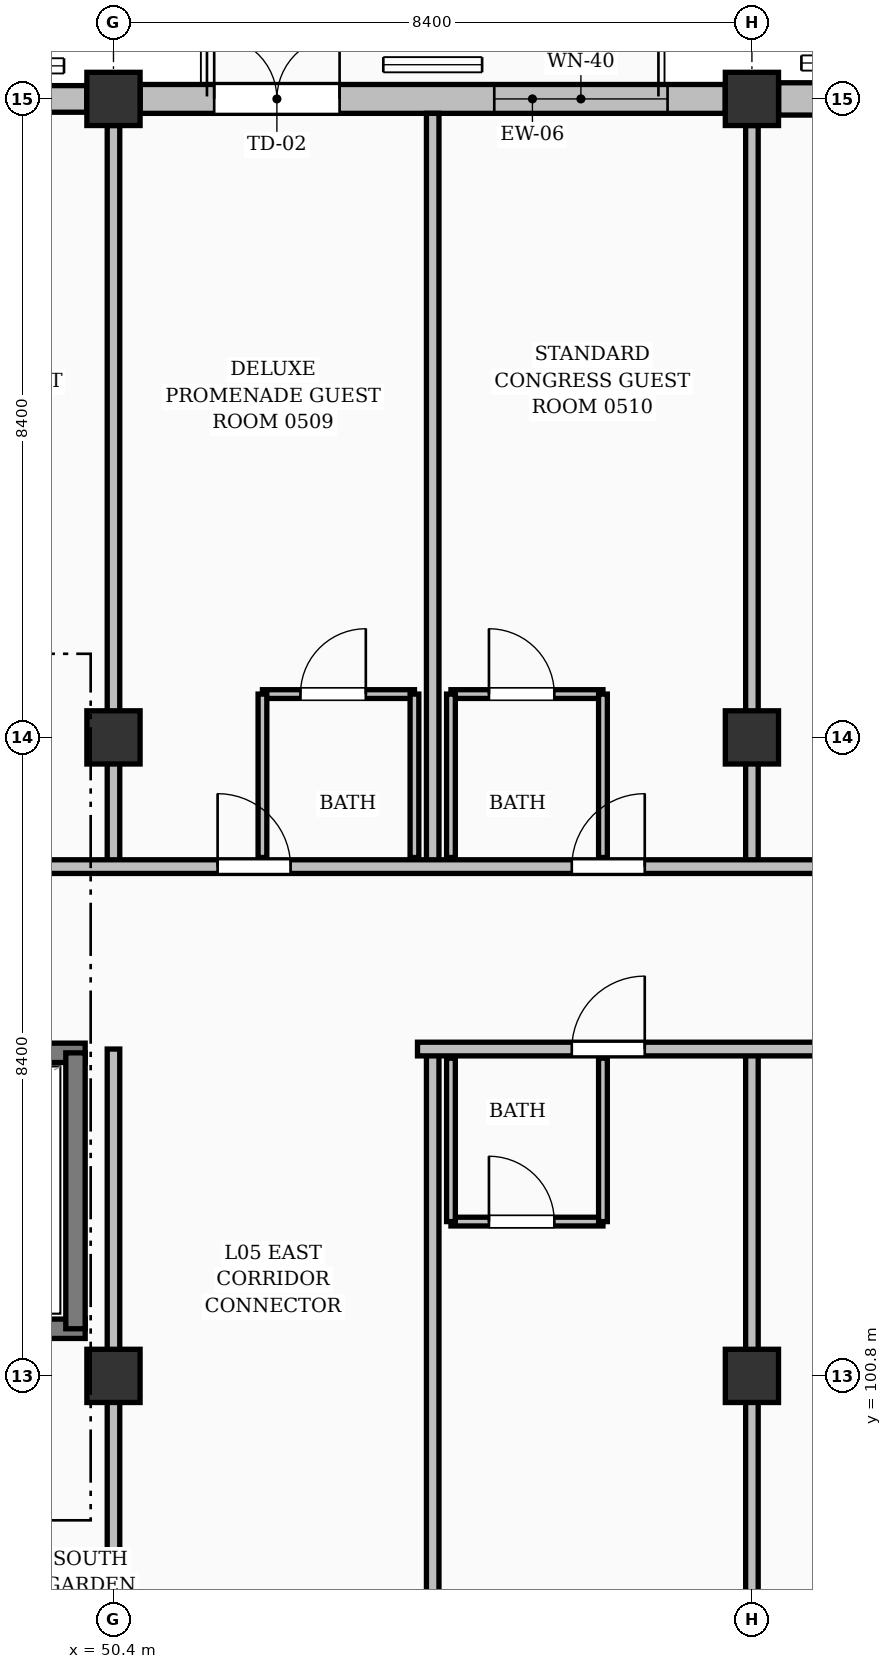
"""IFC4 building model, lengths in metres.
Left out: names, types, materials, properties, quantities, classifications, styles, units other than length and angle.
Written with IfcOpenShell. Run it as: python <this file> out.ifc"""

import sys

from ifc_helpers import new_model, si_unit, direction, frame, frame_2d, origin, origin_2d, place, context, subcontext, project, spatial, rectangle, extrude, element, fill, save


model = new_model("IFC4")
c1 = context("Model", 3, precision=1e-05, world=origin(), true_north=direction((0.0, 1.0)))
c2 = subcontext(c1, "Body", "Model", "MODEL_VIEW")
j1 = project(units=[si_unit("LENGTHUNIT", "METRE"), si_unit("PLANEANGLEUNIT", "RADIAN")], contexts=[c1])
p1 = place(None, origin())
s1 = spatial("IfcSite", under=j1, at=p1, CompositionType="ELEMENT")
p2 = place(p1, origin())
s2 = spatial("IfcBuilding", under=s1, at=p2, CompositionType="ELEMENT")
p3 = place(p2, frame((0.0, 0.0, 18.48)))
s3 = spatial("IfcBuildingStorey", under=s2, at=p3, CompositionType="ELEMENT", Elevation=18.48)
for number, where, z_axis, x_axis in (
    (1, (50.4, 100.8, 0.0), (0.0, 0.0, 1.0), (1.0, 0.0, 0.0)),
    (2, (50.4, 109.2, 0.0), (0.0, 0.0, 1.0), (1.0, 0.0, 0.0)),
    (3, (50.4, 117.6, 0.0), (0.0, 0.0, 1.0), (1.0, 0.0, 0.0)),
    (4, (58.8, 100.8, 0.0), (0.0, 0.0, 1.0), (1.0, 0.0, 0.0)),
    (5, (58.8, 109.2, 0.0), (0.0, 0.0, 1.0), (1.0, 0.0, 0.0)),
    (6, (58.8, 117.6, 0.0), (0.0, 0.0, 1.0), (1.0, 0.0, 0.0)),
):
    element("IfcColumn", number, at=place(p3, frame(where, z_axis=z_axis, x_axis=x_axis)), inside=s3, PredefinedType="COLUMN", context=c2, shape_type="SweptSolid", body=[
        extrude(rectangle(XDim=0.7, YDim=0.7, at=origin_2d()), origin(), (0.0, 0.0, 1.0), 3.36),
    ])
p4 = place(p3, frame((42.351, 117.6, 0.0), z_axis=(0.0, 0.0, 1.0), x_axis=(1.0, 0.0, 0.0)))
e7 = element("IfcWall", 7, at=p4, inside=s3, PredefinedType="SOLIDWALL", context=c2, shape_type="SweptSolid", body=[
    extrude(rectangle(XDim=7.698, YDim=0.35, at=frame_2d((3.849, 0.0))), origin(), (0.0, 0.0, 1.0), 2.494),
])
p5 = place(p4, frame((0.589, 0.0, 0.25)))
e8 = element("IfcOpeningElement", 8, at=p5, cuts=e7, PredefinedType="OPENING", context=c2, shape_type="SweptSolid", body=[
    extrude(rectangle(XDim=2.32, YDim=1.9, at=frame_2d((1.16, 0.95))), frame((0.0, 0.185, 0.0), z_axis=(0.0, -1.0, 0.0), x_axis=(1.0, 0.0, 0.0)), (0.0, 0.0, 1.0), 0.37),
])
p6 = place(p4, frame((4.809, 0.0, 0.25)))
e9 = element("IfcOpeningElement", 9, at=p6, cuts=e7, PredefinedType="OPENING", context=c2, shape_type="SweptSolid", body=[
    extrude(rectangle(XDim=2.28, YDim=2.0, at=frame_2d((1.14, 1.0))), frame((0.0, 0.185, 0.0), z_axis=(0.0, -1.0, 0.0), x_axis=(1.0, 0.0, 0.0)), (0.0, 0.0, 1.0), 0.37),
])
p7 = place(p3, frame((50.751, 117.6, 0.0), z_axis=(0.0, 0.0, 1.0), x_axis=(1.0, 0.0, 0.0)))
e10 = element("IfcWall", 10, at=p7, inside=s3, PredefinedType="SOLIDWALL", context=c2, shape_type="SweptSolid", body=[
    extrude(rectangle(XDim=7.698, YDim=0.38, at=frame_2d((3.849, 0.0))), origin(), (0.0, 0.0, 1.0), 2.494),
])
p8 = place(p7, frame((0.974, 0.0, 0.0)))
e11 = element("IfcOpeningElement", 11, at=p8, cuts=e10, PredefinedType="OPENING", context=c2, shape_type="SweptSolid", body=[
    extrude(rectangle(XDim=1.65, YDim=2.08, at=frame_2d((0.825, 1.04))), frame((0.0, 0.2, 0.0), z_axis=(0.0, -1.0, 0.0), x_axis=(1.0, 0.0, 0.0)), (0.0, 0.0, 1.0), 0.4),
])
p9 = place(p7, frame((4.659, 0.0, 0.25)))
e12 = element("IfcOpeningElement", 12, at=p9, cuts=e10, PredefinedType="OPENING", context=c2, shape_type="SweptSolid", body=[
    extrude(rectangle(XDim=2.28, YDim=2.0, at=frame_2d((1.14, 1.0))), frame((0.0, 0.2, 0.0), z_axis=(0.0, -1.0, 0.0), x_axis=(1.0, 0.0, 0.0)), (0.0, 0.0, 1.0), 0.4),
])
p10 = place(p3, frame((59.151, 117.6, 0.0), z_axis=(0.0, 0.0, 1.0), x_axis=(1.0, 0.0, 0.0)))
e13 = element("IfcWall", 13, at=p10, inside=s3, PredefinedType="SOLIDWALL", context=c2, shape_type="SweptSolid", body=[
    extrude(rectangle(XDim=7.698, YDim=0.425, at=frame_2d((3.849, 0.0))), origin(), (0.0, 0.0, 1.0), 2.494),
])
p11 = place(p10, frame((0.559, 0.0, 0.25)))
e14 = element("IfcOpeningElement", 14, at=p11, cuts=e13, PredefinedType="OPENING", context=c2, shape_type="SweptSolid", body=[
    extrude(rectangle(XDim=2.38, YDim=2.0, at=frame_2d((1.19, 1.0))), frame((0.0, 0.223, 0.0), z_axis=(0.0, -1.0, 0.0), x_axis=(1.0, 0.0, 0.0)), (0.0, 0.0, 1.0), 0.445),
])
p12 = place(p10, frame((4.774, 0.0, 0.25)))
e15 = element("IfcOpeningElement", 15, at=p12, cuts=e13, PredefinedType="OPENING", context=c2, shape_type="SweptSolid", body=[
    extrude(rectangle(XDim=2.35, YDim=1.85, at=frame_2d((1.175, 0.925))), frame((0.0, 0.223, 0.0), z_axis=(0.0, -1.0, 0.0), x_axis=(1.0, 0.0, 0.0)), (0.0, 0.0, 1.0), 0.445),
])
p13 = place(p3, frame((41.802, 101.42, 0.0), z_axis=(0.0, 0.0, 1.0), x_axis=(1.0, 0.0, 0.0)))
e16 = element("IfcWall", 16, at=p13, inside=s3, PredefinedType="SOLIDWALL", context=c2, shape_type="SweptSolid", body=[
    extrude(rectangle(XDim=8.225, YDim=0.255, at=frame_2d((4.113, 0.0))), origin(), (0.0, 0.0, 1.0), 3.12),
])
p14 = place(p3, frame((41.802, 105.05, 0.0), z_axis=(0.0, 0.0, 1.0), x_axis=(1.0, 0.0, 0.0)))
e17 = element("IfcWall", 17, at=p14, inside=s3, PredefinedType="SOLIDWALL", context=c2, shape_type="SweptSolid", body=[
    extrude(rectangle(XDim=8.225, YDim=0.255, at=frame_2d((4.113, 0.0))), origin(), (0.0, 0.0, 1.0), 3.12),
])
p15 = place(p14, frame((0.35, 0.0, 0.0)))
e18 = element("IfcOpeningElement", 18, at=p15, cuts=e17, PredefinedType="OPENING", context=c2, shape_type="SweptSolid", body=[
    extrude(rectangle(XDim=1.16, YDim=2.15, at=frame_2d((0.58, 1.075))), frame((0.0, 0.137, 0.0), z_axis=(0.0, -1.0, 0.0), x_axis=(1.0, 0.0, 0.0)), (0.0, 0.0, 1.0), 0.275),
])
p16 = place(p3, frame((49.9, 101.42, 0.0), z_axis=(0.0, 0.0, 1.0), x_axis=(0.0, 1.0, 0.0)))
e19 = element("IfcWall", 19, at=p16, inside=s3, PredefinedType="SOLIDWALL", context=c2, shape_type="SweptSolid", body=[
    extrude(rectangle(XDim=3.63, YDim=0.255, at=frame_2d((1.815, 0.0))), origin(), (0.0, 0.0, 1.0), 3.12),
])
p17 = place(p3, frame((52.36, 109.77, 0.0), z_axis=(0.0, 0.0, 1.0), x_axis=(1.0, 0.0, 0.0)))
e20 = element("IfcWall", 20, at=p17, inside=s3, PredefinedType="PARTITIONING", context=c2, shape_type="SweptSolid", body=[
    extrude(rectangle(XDim=2.0, YDim=0.115, at=frame_2d((1.0, 0.0))), origin(), (0.0, 0.0, 1.0), 3.12),
])
p18 = place(p17, frame((0.5, 0.0, 0.0)))
e21 = element("IfcOpeningElement", 21, at=p18, cuts=e20, PredefinedType="OPENING", context=c2, shape_type="SweptSolid", body=[
    extrude(rectangle(XDim=0.86, YDim=2.05, at=frame_2d((0.43, 1.025))), frame((0.0, 0.067, 0.0), z_axis=(0.0, -1.0, 0.0), x_axis=(1.0, 0.0, 0.0)), (0.0, 0.0, 1.0), 0.135),
])
for number, where, z_axis, x_axis in (
    (22, (52.36, 107.62, 0.0), (0.0, 0.0, 1.0), (0.0, 1.0, 0.0)),
    (23, (54.36, 107.62, 0.0), (0.0, 0.0, 1.0), (0.0, 1.0, 0.0)),
):
    element("IfcWall", number, at=place(p3, frame(where, z_axis=z_axis, x_axis=x_axis)), inside=s3, PredefinedType="PARTITIONING", context=c2, shape_type="SweptSolid", body=[
        extrude(rectangle(XDim=2.15, YDim=0.115, at=frame_2d((1.075, 0.0))), origin(), (0.0, 0.0, 1.0), 3.12),
    ])
p19 = place(p3, frame((54.84, 109.77, 0.0), z_axis=(0.0, 0.0, 1.0), x_axis=(1.0, 0.0, 0.0)))
e24 = element("IfcWall", 24, at=p19, inside=s3, PredefinedType="PARTITIONING", context=c2, shape_type="SweptSolid", body=[
    extrude(rectangle(XDim=2.0, YDim=0.115, at=frame_2d((1.0, 0.0))), origin(), (0.0, 0.0, 1.0), 3.12),
])
p20 = place(p19, frame((0.5, 0.0, 0.0)))
e25 = element("IfcOpeningElement", 25, at=p20, cuts=e24, PredefinedType="OPENING", context=c2, shape_type="SweptSolid", body=[
    extrude(rectangle(XDim=0.86, YDim=2.05, at=frame_2d((0.43, 1.025))), frame((0.0, 0.067, 0.0), z_axis=(0.0, -1.0, 0.0), x_axis=(1.0, 0.0, 0.0)), (0.0, 0.0, 1.0), 0.135),
])
for number, where, z_axis, x_axis in (
    (26, (54.84, 107.62, 0.0), (0.0, 0.0, 1.0), (0.0, 1.0, 0.0)),
    (27, (56.84, 107.62, 0.0), (0.0, 0.0, 1.0), (0.0, 1.0, 0.0)),
):
    element("IfcWall", number, at=place(p3, frame(where, z_axis=z_axis, x_axis=x_axis)), inside=s3, PredefinedType="PARTITIONING", context=c2, shape_type="SweptSolid", body=[
        extrude(rectangle(XDim=2.15, YDim=0.115, at=frame_2d((1.075, 0.0))), origin(), (0.0, 0.0, 1.0), 3.12),
    ])
p21 = place(p3, frame((54.6, 107.5, 0.0), z_axis=(0.0, 0.0, 1.0), x_axis=(0.0, 1.0, 0.0)))
e28 = element("IfcWall", 28, at=p21, inside=s3, PredefinedType="PARTITIONING", context=c2, shape_type="SweptSolid", body=[
    extrude(rectangle(XDim=9.91, YDim=0.165, at=frame_2d((4.955, 0.0))), origin(), (0.0, 0.0, 1.0), 3.12),
])
for number, where, z_axis, x_axis in (
    (29, (50.4, 107.5, 0.0), (0.0, 0.0, 1.0), (0.0, 1.0, 0.0)),
    (30, (58.8, 107.5, 0.0), (0.0, 0.0, 1.0), (0.0, 1.0, 0.0)),
):
    element("IfcWall", number, at=place(p3, frame(where, z_axis=z_axis, x_axis=x_axis)), inside=s3, PredefinedType="PARTITIONING", context=c2, shape_type="SweptSolid", body=[
        extrude(rectangle(XDim=9.75, YDim=0.165, at=frame_2d((4.875, 0.0))), origin(), (0.0, 0.0, 1.0), 2.455),
    ])
p22 = place(p3, frame((40.66, 107.5, 0.0), z_axis=(0.0, 0.0, 1.0), x_axis=(1.0, 0.0, 0.0)))
e31 = element("IfcWall", 31, at=p22, inside=s3, PredefinedType="PARTITIONING", context=c2, shape_type="SweptSolid", body=[
    extrude(rectangle(XDim=43.21, YDim=0.18, at=frame_2d((21.605, 0.0))), origin(), (0.0, 0.0, 1.0), 3.12),
])
p23 = place(p22, frame((0.2, 0.0, 0.0)))
e32 = element("IfcOpeningElement", 32, at=p23, cuts=e31, PredefinedType="OPENING", context=c2, shape_type="SweptSolid", body=[
    extrude(rectangle(XDim=0.94, YDim=2.1, at=frame_2d((0.47, 1.05))), frame((0.0, 0.1, 0.0), z_axis=(0.0, -1.0, 0.0), x_axis=(1.0, 0.0, 0.0)), (0.0, 0.0, 1.0), 0.2),
])
p24 = place(p22, frame((2.71, 0.0, 0.0)))
e33 = element("IfcOpeningElement", 33, at=p24, cuts=e31, PredefinedType="OPENING", context=c2, shape_type="SweptSolid", body=[
    extrude(rectangle(XDim=0.96, YDim=2.15, at=frame_2d((0.48, 1.075))), frame((0.0, 0.1, 0.0), z_axis=(0.0, -1.0, 0.0), x_axis=(1.0, 0.0, 0.0)), (0.0, 0.0, 1.0), 0.2),
])
p25 = place(p22, frame((7.37, 0.0, 0.0)))
e34 = element("IfcOpeningElement", 34, at=p25, cuts=e31, PredefinedType="OPENING", context=c2, shape_type="SweptSolid", body=[
    extrude(rectangle(XDim=0.96, YDim=2.15, at=frame_2d((0.48, 1.075))), frame((0.0, 0.1, 0.0), z_axis=(0.0, -1.0, 0.0), x_axis=(1.0, 0.0, 0.0)), (0.0, 0.0, 1.0), 0.2),
])
p26 = place(p22, frame((11.11, 0.0, 0.0)))
e35 = element("IfcOpeningElement", 35, at=p26, cuts=e31, PredefinedType="OPENING", context=c2, shape_type="SweptSolid", body=[
    extrude(rectangle(XDim=0.96, YDim=2.15, at=frame_2d((0.48, 1.075))), frame((0.0, 0.1, 0.0), z_axis=(0.0, -1.0, 0.0), x_axis=(1.0, 0.0, 0.0)), (0.0, 0.0, 1.0), 0.2),
])
p27 = place(p22, frame((15.77, 0.0, 0.0)))
e36 = element("IfcOpeningElement", 36, at=p27, cuts=e31, PredefinedType="OPENING", context=c2, shape_type="SweptSolid", body=[
    extrude(rectangle(XDim=0.96, YDim=2.15, at=frame_2d((0.48, 1.075))), frame((0.0, 0.1, 0.0), z_axis=(0.0, -1.0, 0.0), x_axis=(1.0, 0.0, 0.0)), (0.0, 0.0, 1.0), 0.2),
])
p28 = place(p22, frame((19.51, 0.0, 0.0)))
e37 = element("IfcOpeningElement", 37, at=p28, cuts=e31, PredefinedType="OPENING", context=c2, shape_type="SweptSolid", body=[
    extrude(rectangle(XDim=0.96, YDim=2.15, at=frame_2d((0.48, 1.075))), frame((0.0, 0.1, 0.0), z_axis=(0.0, -1.0, 0.0), x_axis=(1.0, 0.0, 0.0)), (0.0, 0.0, 1.0), 0.2),
])
p29 = place(p22, frame((24.17, 0.0, 0.0)))
e38 = element("IfcOpeningElement", 38, at=p29, cuts=e31, PredefinedType="OPENING", context=c2, shape_type="SweptSolid", body=[
    extrude(rectangle(XDim=0.96, YDim=2.15, at=frame_2d((0.48, 1.075))), frame((0.0, 0.1, 0.0), z_axis=(0.0, -1.0, 0.0), x_axis=(1.0, 0.0, 0.0)), (0.0, 0.0, 1.0), 0.2),
])
p30 = place(p22, frame((27.91, 0.0, 0.0)))
e39 = element("IfcOpeningElement", 39, at=p30, cuts=e31, PredefinedType="OPENING", context=c2, shape_type="SweptSolid", body=[
    extrude(rectangle(XDim=0.96, YDim=2.15, at=frame_2d((0.48, 1.075))), frame((0.0, 0.1, 0.0), z_axis=(0.0, -1.0, 0.0), x_axis=(1.0, 0.0, 0.0)), (0.0, 0.0, 1.0), 0.2),
])
p31 = place(p22, frame((32.57, 0.0, 0.0)))
e40 = element("IfcOpeningElement", 40, at=p31, cuts=e31, PredefinedType="OPENING", context=c2, shape_type="SweptSolid", body=[
    extrude(rectangle(XDim=0.96, YDim=2.15, at=frame_2d((0.48, 1.075))), frame((0.0, 0.1, 0.0), z_axis=(0.0, -1.0, 0.0), x_axis=(1.0, 0.0, 0.0)), (0.0, 0.0, 1.0), 0.2),
])
p32 = place(p22, frame((36.44, 0.0, 0.0)))
e41 = element("IfcOpeningElement", 41, at=p32, cuts=e31, PredefinedType="OPENING", context=c2, shape_type="SweptSolid", body=[
    extrude(rectangle(XDim=1.02, YDim=2.15, at=frame_2d((0.51, 1.075))), frame((0.0, 0.1, 0.0), z_axis=(0.0, -1.0, 0.0), x_axis=(1.0, 0.0, 0.0)), (0.0, 0.0, 1.0), 0.2),
])
p33 = place(p3, frame((54.84, 102.83, 0.0), z_axis=(0.0, 0.0, 1.0), x_axis=(1.0, 0.0, 0.0)))
e42 = element("IfcWall", 42, at=p33, inside=s3, PredefinedType="PARTITIONING", context=c2, shape_type="SweptSolid", body=[
    extrude(rectangle(XDim=2.0, YDim=0.115, at=frame_2d((1.0, 0.0))), origin(), (0.0, 0.0, 1.0), 3.12),
])
p34 = place(p33, frame((0.5, 0.0, 0.0)))
e43 = element("IfcOpeningElement", 43, at=p34, cuts=e42, PredefinedType="OPENING", context=c2, shape_type="SweptSolid", body=[
    extrude(rectangle(XDim=0.86, YDim=2.05, at=frame_2d((0.43, 1.025))), frame((0.0, 0.067, 0.0), z_axis=(0.0, -1.0, 0.0), x_axis=(1.0, 0.0, 0.0)), (0.0, 0.0, 1.0), 0.135),
])
for number, where, z_axis, x_axis in (
    (44, (54.84, 102.83, 0.0), (0.0, 0.0, 1.0), (0.0, 1.0, 0.0)),
    (45, (56.84, 102.83, 0.0), (0.0, 0.0, 1.0), (0.0, 1.0, 0.0)),
):
    element("IfcWall", number, at=place(p3, frame(where, z_axis=z_axis, x_axis=x_axis)), inside=s3, PredefinedType="PARTITIONING", context=c2, shape_type="SweptSolid", body=[
        extrude(rectangle(XDim=2.15, YDim=0.115, at=frame_2d((1.075, 0.0))), origin(), (0.0, 0.0, 1.0), 3.12),
    ])
p35 = place(p3, frame((54.6, 92.59, 0.0), z_axis=(0.0, 0.0, 1.0), x_axis=(0.0, 1.0, 0.0)))
e46 = element("IfcWall", 46, at=p35, inside=s3, PredefinedType="PARTITIONING", context=c2, shape_type="SweptSolid", body=[
    extrude(rectangle(XDim=12.51, YDim=0.165, at=frame_2d((6.255, 0.0))), origin(), (0.0, 0.0, 1.0), 3.12),
])
for number, where, z_axis, x_axis in (
    (47, (50.4, 92.75, 0.0), (0.0, 0.0, 1.0), (0.0, 1.0, 0.0)),
    (48, (58.8, 92.75, 0.0), (0.0, 0.0, 1.0), (0.0, 1.0, 0.0)),
):
    element("IfcWall", number, at=place(p3, frame(where, z_axis=z_axis, x_axis=x_axis)), inside=s3, PredefinedType="PARTITIONING", context=c2, shape_type="SweptSolid", body=[
        extrude(rectangle(XDim=12.35, YDim=0.165, at=frame_2d((6.175, 0.0))), origin(), (0.0, 0.0, 1.0), 2.455),
    ])
p36 = place(p3, frame((54.4, 105.1, 0.0), z_axis=(0.0, 0.0, 1.0), x_axis=(1.0, 0.0, 0.0)))
e49 = element("IfcWall", 49, at=p36, inside=s3, PredefinedType="PARTITIONING", context=c2, shape_type="SweptSolid", body=[
    extrude(rectangle(XDim=29.47, YDim=0.18, at=frame_2d((14.735, 0.0))), origin(), (0.0, 0.0, 1.0), 3.12),
])
p37 = place(p36, frame((2.03, 0.0, 0.0)))
e50 = element("IfcOpeningElement", 50, at=p37, cuts=e49, PredefinedType="OPENING", context=c2, shape_type="SweptSolid", body=[
    extrude(rectangle(XDim=0.96, YDim=2.15, at=frame_2d((0.48, 1.075))), frame((0.0, 0.1, 0.0), z_axis=(0.0, -1.0, 0.0), x_axis=(1.0, 0.0, 0.0)), (0.0, 0.0, 1.0), 0.2),
])
p38 = place(p36, frame((5.77, 0.0, 0.0)))
e51 = element("IfcOpeningElement", 51, at=p38, cuts=e49, PredefinedType="OPENING", context=c2, shape_type="SweptSolid", body=[
    extrude(rectangle(XDim=0.96, YDim=2.15, at=frame_2d((0.48, 1.075))), frame((0.0, 0.1, 0.0), z_axis=(0.0, -1.0, 0.0), x_axis=(1.0, 0.0, 0.0)), (0.0, 0.0, 1.0), 0.2),
])
p39 = place(p36, frame((10.43, 0.0, 0.0)))
e52 = element("IfcOpeningElement", 52, at=p39, cuts=e49, PredefinedType="OPENING", context=c2, shape_type="SweptSolid", body=[
    extrude(rectangle(XDim=0.96, YDim=2.15, at=frame_2d((0.48, 1.075))), frame((0.0, 0.1, 0.0), z_axis=(0.0, -1.0, 0.0), x_axis=(1.0, 0.0, 0.0)), (0.0, 0.0, 1.0), 0.2),
])
p40 = place(p36, frame((14.17, 0.0, 0.0)))
e53 = element("IfcOpeningElement", 53, at=p40, cuts=e49, PredefinedType="OPENING", context=c2, shape_type="SweptSolid", body=[
    extrude(rectangle(XDim=0.96, YDim=2.15, at=frame_2d((0.48, 1.075))), frame((0.0, 0.1, 0.0), z_axis=(0.0, -1.0, 0.0), x_axis=(1.0, 0.0, 0.0)), (0.0, 0.0, 1.0), 0.2),
])
p41 = place(p36, frame((18.83, 0.0, 0.0)))
e54 = element("IfcOpeningElement", 54, at=p41, cuts=e49, PredefinedType="OPENING", context=c2, shape_type="SweptSolid", body=[
    extrude(rectangle(XDim=0.96, YDim=2.15, at=frame_2d((0.48, 1.075))), frame((0.0, 0.1, 0.0), z_axis=(0.0, -1.0, 0.0), x_axis=(1.0, 0.0, 0.0)), (0.0, 0.0, 1.0), 0.2),
])
p42 = place(p36, frame((22.7, 0.0, 0.0)))
e55 = element("IfcOpeningElement", 55, at=p42, cuts=e49, PredefinedType="OPENING", context=c2, shape_type="SweptSolid", body=[
    extrude(rectangle(XDim=1.02, YDim=2.15, at=frame_2d((0.51, 1.075))), frame((0.0, 0.1, 0.0), z_axis=(0.0, -1.0, 0.0), x_axis=(1.0, 0.0, 0.0)), (0.0, 0.0, 1.0), 0.2),
])
p43 = place(p8, origin())
e56 = element("IfcDoor", 56, at=p43, inside=s3, OperationType="DOUBLE_DOOR_SINGLE_SWING", PredefinedType="DOOR", context=c2, shape_type="SweptSolid", body=[
    extrude(rectangle(XDim=1.65, YDim=2.08, at=frame_2d((0.825, 1.04))), frame((0.0, 0.025, 0.0), z_axis=(0.0, -1.0, 0.0), x_axis=(1.0, 0.0, 0.0)), (0.0, 0.0, 1.0), 0.05),
])
fill(e11, e56)
p44 = place(p9, origin())
e57 = element("IfcWindow", 57, at=p44, inside=s3, PartitioningType="DOUBLE_PANEL_VERTICAL", PredefinedType="WINDOW", context=c2, shape_type="SweptSolid", body=[
    extrude(rectangle(XDim=2.28, YDim=2.0, at=frame_2d((1.14, 1.0))), frame((0.0, 0.03, 0.0), z_axis=(0.0, -1.0, 0.0), x_axis=(1.0, 0.0, 0.0)), (0.0, 0.0, 1.0), 0.06),
])
fill(e12, e57)
p45 = place(p18, origin())
e58 = element("IfcDoor", 58, at=p45, inside=s3, OperationType="SINGLE_SWING_RIGHT", PredefinedType="DOOR", context=c2, shape_type="SweptSolid", body=[
    extrude(rectangle(XDim=0.86, YDim=2.05, at=frame_2d((0.43, 1.025))), frame((0.0, 0.025, 0.0), z_axis=(0.0, -1.0, 0.0), x_axis=(1.0, 0.0, 0.0)), (0.0, 0.0, 1.0), 0.05),
])
fill(e21, e58)
p46 = place(p20, origin())
e59 = element("IfcDoor", 59, at=p46, inside=s3, OperationType="SINGLE_SWING_LEFT", PredefinedType="DOOR", context=c2, shape_type="SweptSolid", body=[
    extrude(rectangle(XDim=0.86, YDim=2.05, at=frame_2d((0.43, 1.025))), frame((0.0, 0.025, 0.0), z_axis=(0.0, -1.0, 0.0), x_axis=(1.0, 0.0, 0.0)), (0.0, 0.0, 1.0), 0.05),
])
fill(e25, e59)
p47 = place(p26, origin())
e60 = element("IfcDoor", 60, at=p47, inside=s3, OperationType="SINGLE_SWING_LEFT", PredefinedType="DOOR", context=c2, shape_type="SweptSolid", body=[
    extrude(rectangle(XDim=0.96, YDim=2.15, at=frame_2d((0.48, 1.075))), frame((0.0, 0.025, 0.0), z_axis=(0.0, -1.0, 0.0), x_axis=(1.0, 0.0, 0.0)), (0.0, 0.0, 1.0), 0.05),
])
fill(e35, e60)
p48 = place(p27, origin())
e61 = element("IfcDoor", 61, at=p48, inside=s3, OperationType="SINGLE_SWING_RIGHT", PredefinedType="DOOR", context=c2, shape_type="SweptSolid", body=[
    extrude(rectangle(XDim=0.96, YDim=2.15, at=frame_2d((0.48, 1.075))), frame((0.0, 0.025, 0.0), z_axis=(0.0, -1.0, 0.0), x_axis=(1.0, 0.0, 0.0)), (0.0, 0.0, 1.0), 0.05),
])
fill(e36, e61)
p49 = place(p34, origin())
e62 = element("IfcDoor", 62, at=p49, inside=s3, OperationType="SINGLE_SWING_LEFT", PredefinedType="DOOR", context=c2, shape_type="SweptSolid", body=[
    extrude(rectangle(XDim=0.86, YDim=2.05, at=frame_2d((0.43, 1.025))), frame((0.0, 0.025, 0.0), z_axis=(0.0, -1.0, 0.0), x_axis=(1.0, 0.0, 0.0)), (0.0, 0.0, 1.0), 0.05),
])
fill(e43, e62)
p50 = place(p37, origin())
e63 = element("IfcDoor", 63, at=p50, inside=s3, OperationType="SINGLE_SWING_RIGHT", PredefinedType="DOOR", context=c2, shape_type="SweptSolid", body=[
    extrude(rectangle(XDim=0.96, YDim=2.15, at=frame_2d((0.48, 1.075))), frame((0.0, 0.025, 0.0), z_axis=(0.0, -1.0, 0.0), x_axis=(1.0, 0.0, 0.0)), (0.0, 0.0, 1.0), 0.05),
])
fill(e50, e63)
save(model, sys.argv[1])
